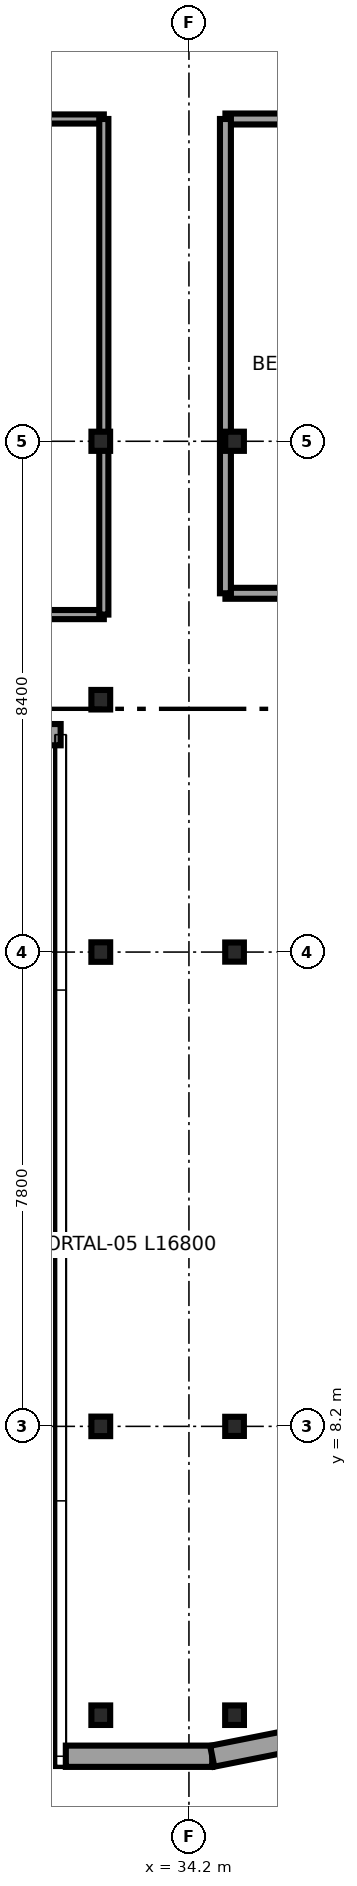
"""IFC4 building model, lengths in metres.
Left out: names, types, materials, properties, quantities, classifications, styles, units other than length and angle.
Written with IfcOpenShell. Run it as: python <this file> out.ifc"""

import sys

from ifc_helpers import new_model, si_unit, direction, frame, frame_2d, origin, origin_2d, place, context, subcontext, project, spatial, rectangle, i_section, extrude, source, transform, mapped, element, save


model = new_model("IFC4")
c1 = context("Model", 3, precision=1e-05, world=origin(), true_north=direction((0.0, 1.0)))
c2 = subcontext(c1, "Body", "Model", "MODEL_VIEW")
j1 = project(units=[si_unit("LENGTHUNIT", "METRE"), si_unit("PLANEANGLEUNIT", "RADIAN")], contexts=[c1])
p1 = place(None, origin())
s1 = spatial("IfcSite", under=j1, at=p1, CompositionType="ELEMENT")
p2 = place(p1, origin())
s2 = spatial("IfcBuilding", under=s1, at=p2, CompositionType="ELEMENT")
p3 = place(p2, frame((0.0, 0.0, 248.75)))
s3 = spatial("IfcBuildingStorey", under=s2, at=p3, CompositionType="ELEMENT", Elevation=248.75)
m1 = source(origin(), c2, "Body", "SweptSolid", [
    extrude(i_section(OverallWidth=0.309, OverallDepth=0.321, WebThickness=0.014, FlangeThickness=0.022, FilletRadius=0.017, at=origin_2d()), origin(), (0.0, 0.0, 1.0), 3.55),
])
for number, where, z_axis, x_axis in (
    (1, (32.75, 3.45, 0.0), (0.0, 0.0, 1.0), (1.0, 0.0, 0.0)),
    (2, (32.75, 8.2, 0.0), (0.0, 0.0, 1.0), (1.0, 0.0, 0.0)),
    (3, (32.75, 16.0, 0.0), (0.0, 0.0, 1.0), (1.0, 0.0, 0.0)),
    (4, (34.95, 3.45, 0.0), (0.0, 0.0, 1.0), (1.0, 0.0, 0.0)),
):
    element("IfcColumn", number, at=place(p3, frame(where, z_axis=z_axis, x_axis=x_axis)), inside=s3, PredefinedType="COLUMN", context=c2, shape_type="MappedRepresentation", body=[
        mapped(m1, transform((0.0, 0.0, 0.0), x_axis=(1.0, 0.0, 0.0), y_axis=(0.0, 1.0, 0.0), z_axis=(0.0, 0.0, 1.0), scale=1.0)),
    ])
m2 = source(origin(), c2, "Body", "SweptSolid", [
    extrude(i_section(OverallWidth=0.307, OverallDepth=0.315, WebThickness=0.012, FlangeThickness=0.019, FilletRadius=0.017, at=origin_2d()), origin(), (0.0, 0.0, 1.0), 3.55),
])
for number, where, z_axis, x_axis in (
    (5, (34.95, 8.2, 0.0), (0.0, 0.0, 1.0), (1.0, 0.0, 0.0)),
    (6, (34.95, 16.0, 0.0), (0.0, 0.0, 1.0), (1.0, 0.0, 0.0)),
    (7, (32.75, 24.4, 0.0), (0.0, 0.0, 1.0), (1.0, 0.0, 0.0)),
    (8, (34.95, 24.4, 0.0), (0.0, 0.0, 1.0), (1.0, 0.0, 0.0)),
):
    element("IfcColumn", number, at=place(p3, frame(where, z_axis=z_axis, x_axis=x_axis)), inside=s3, PredefinedType="COLUMN", context=c2, shape_type="MappedRepresentation", body=[
        mapped(m2, transform((0.0, 0.0, 0.0), x_axis=(1.0, 0.0, 0.0), y_axis=(0.0, 1.0, 0.0), z_axis=(0.0, 0.0, 1.0), scale=1.0)),
    ])
p4 = place(p3, frame((32.75, 20.15, 0.0), z_axis=(0.0, 0.0, 1.0), x_axis=(1.0, 0.0, 0.0)))
e9 = element("IfcColumn", 9, at=p4, inside=s3, PredefinedType="COLUMN", context=c2, shape_type="MappedRepresentation", body=[
    mapped(m1, transform((0.0, 0.0, 0.0), x_axis=(1.0, 0.0, 0.0), y_axis=(0.0, 1.0, 0.0), z_axis=(0.0, 0.0, 1.0), scale=1.0)),
])
p5 = place(p3, frame((15.11, 19.575, 0.0), z_axis=(0.0, 0.0, 1.0), x_axis=(1.0, 0.0, 0.0)))
e10 = element("IfcWall", 10, at=p5, inside=s3, PredefinedType="SOLIDWALL", context=c2, shape_type="SweptSolid", body=[
    extrude(rectangle(XDim=16.98, YDim=0.35, at=frame_2d((8.49, 0.0))), origin(), (0.0, 0.0, 1.0), 3.37),
])
p6 = place(p5, frame((1.88, 0.0, 0.68)))
e11 = element("IfcOpeningElement", 11, at=p6, cuts=e10, PredefinedType="OPENING", context=c2, shape_type="SweptSolid", body=[
    extrude(rectangle(XDim=2.7, YDim=1.95, at=frame_2d((1.35, 0.975))), frame((0.0, 0.185, 0.0), z_axis=(0.0, -1.0, 0.0), x_axis=(1.0, 0.0, 0.0)), (0.0, 0.0, 1.0), 0.37),
])
p7 = place(p5, frame((7.14, 0.0, 0.68)))
e12 = element("IfcOpeningElement", 12, at=p7, cuts=e10, PredefinedType="OPENING", context=c2, shape_type="SweptSolid", body=[
    extrude(rectangle(XDim=2.7, YDim=1.95, at=frame_2d((1.35, 0.975))), frame((0.0, 0.185, 0.0), z_axis=(0.0, -1.0, 0.0), x_axis=(1.0, 0.0, 0.0)), (0.0, 0.0, 1.0), 0.37),
])
p8 = place(p5, frame((12.4, 0.0, 0.68)))
e13 = element("IfcOpeningElement", 13, at=p8, cuts=e10, PredefinedType="OPENING", context=c2, shape_type="SweptSolid", body=[
    extrude(rectangle(XDim=2.7, YDim=1.95, at=frame_2d((1.35, 0.975))), frame((0.0, 0.185, 0.0), z_axis=(0.0, -1.0, 0.0), x_axis=(1.0, 0.0, 0.0)), (0.0, 0.0, 1.0), 0.37),
])
p9 = place(p3, frame((32.175, 2.775, 0.0), z_axis=(0.0, 0.0, 1.0), x_axis=(1.0, 0.0, 0.0)))
e14 = element("IfcWall", 14, at=p9, inside=s3, PredefinedType="SOLIDWALL", context=c2, shape_type="SweptSolid", body=[
    extrude(rectangle(XDim=2.408, YDim=0.35, at=frame_2d((1.204, 0.0))), origin(), (0.0, 0.0, 1.0), 3.37),
])
p10 = place(p3, frame((34.583, 2.775, 0.0), z_axis=(0.0, 0.0, 1.0), x_axis=(0.980794424524, 0.195044345786, 0.0)))
e15 = element("IfcWall", 15, at=p10, inside=s3, PredefinedType="SOLIDWALL", context=c2, shape_type="SweptSolid", body=[
    extrude(rectangle(XDim=1.665, YDim=0.35, at=frame_2d((0.833, 0.0))), origin(), (0.0, 0.0, 1.0), 3.37),
])
p11 = place(p3, frame((22.4, 21.55, 0.0), z_axis=(0.0, 0.0, 1.0), x_axis=(1.0, 0.0, 0.0)))
e16 = element("IfcWall", 16, at=p11, inside=s3, PredefinedType="PARTITIONING", context=c2, shape_type="SweptSolid", body=[
    extrude(rectangle(XDim=10.4, YDim=0.15, at=frame_2d((5.2, 0.0))), origin(), (0.0, 0.0, 1.0), 3.37),
])
p12 = place(p11, frame((4.075, 0.0, 0.0)))
e17 = element("IfcOpeningElement", 17, at=p12, cuts=e16, PredefinedType="OPENING", context=c2, shape_type="SweptSolid", body=[
    extrude(rectangle(XDim=1.65, YDim=2.15, at=frame_2d((0.825, 1.075))), frame((0.0, 0.085, 0.0), z_axis=(0.0, -1.0, 0.0), x_axis=(1.0, 0.0, 0.0)), (0.0, 0.0, 1.0), 0.17),
])
p13 = place(p3, frame((22.4, 29.7, 0.0), z_axis=(0.0, 0.0, 1.0), x_axis=(1.0, 0.0, 0.0)))
e18 = element("IfcWall", 18, at=p13, inside=s3, PredefinedType="PARTITIONING", context=c2, shape_type="SweptSolid", body=[
    extrude(rectangle(XDim=10.4, YDim=0.15, at=frame_2d((5.2, 0.0))), origin(), (0.0, 0.0, 1.0), 3.37),
])
p14 = place(p3, frame((32.8, 21.55, 0.0), z_axis=(0.0, 0.0, 1.0), x_axis=(0.0, 1.0, 0.0)))
e19 = element("IfcWall", 19, at=p14, inside=s3, PredefinedType="PARTITIONING", context=c2, shape_type="SweptSolid", body=[
    extrude(rectangle(XDim=8.15, YDim=0.15, at=frame_2d((4.075, 0.0))), origin(), (0.0, 0.0, 1.0), 2.827),
])
p15 = place(p3, frame((34.8, 21.9, 0.0), z_axis=(0.0, 0.0, 1.0), x_axis=(1.0, 0.0, 0.0)))
e20 = element("IfcWall", 20, at=p15, inside=s3, PredefinedType="PARTITIONING", context=c2, shape_type="SweptSolid", body=[
    extrude(rectangle(XDim=3.795, YDim=0.18, at=frame_2d((1.897, 0.0))), origin(), (0.0, 0.0, 1.0), 3.37),
])
p16 = place(p3, frame((34.8, 29.7, 0.0), z_axis=(0.0, 0.0, 1.0), x_axis=(1.0, 0.0, 0.0)))
e21 = element("IfcWall", 21, at=p16, inside=s3, PredefinedType="PARTITIONING", context=c2, shape_type="SweptSolid", body=[
    extrude(rectangle(XDim=3.795, YDim=0.18, at=frame_2d((1.897, 0.0))), origin(), (0.0, 0.0, 1.0), 3.37),
])
p17 = place(p16, frame((1.073, 0.0, 0.0)))
e22 = element("IfcOpeningElement", 22, at=p17, cuts=e21, PredefinedType="OPENING", context=c2, shape_type="SweptSolid", body=[
    extrude(rectangle(XDim=1.65, YDim=2.15, at=frame_2d((0.825, 1.075))), frame((0.0, 0.1, 0.0), z_axis=(0.0, -1.0, 0.0), x_axis=(1.0, 0.0, 0.0)), (0.0, 0.0, 1.0), 0.2),
])
p18 = place(p3, frame((34.8, 21.9, 0.0), z_axis=(0.0, 0.0, 1.0), x_axis=(0.0, 1.0, 0.0)))
e23 = element("IfcWall", 23, at=p18, inside=s3, PredefinedType="PARTITIONING", context=c2, shape_type="SweptSolid", body=[
    extrude(rectangle(XDim=7.8, YDim=0.18, at=frame_2d((3.9, 0.0))), origin(), (0.0, 0.0, 1.0), 2.827),
])
save(model, sys.argv[1])
